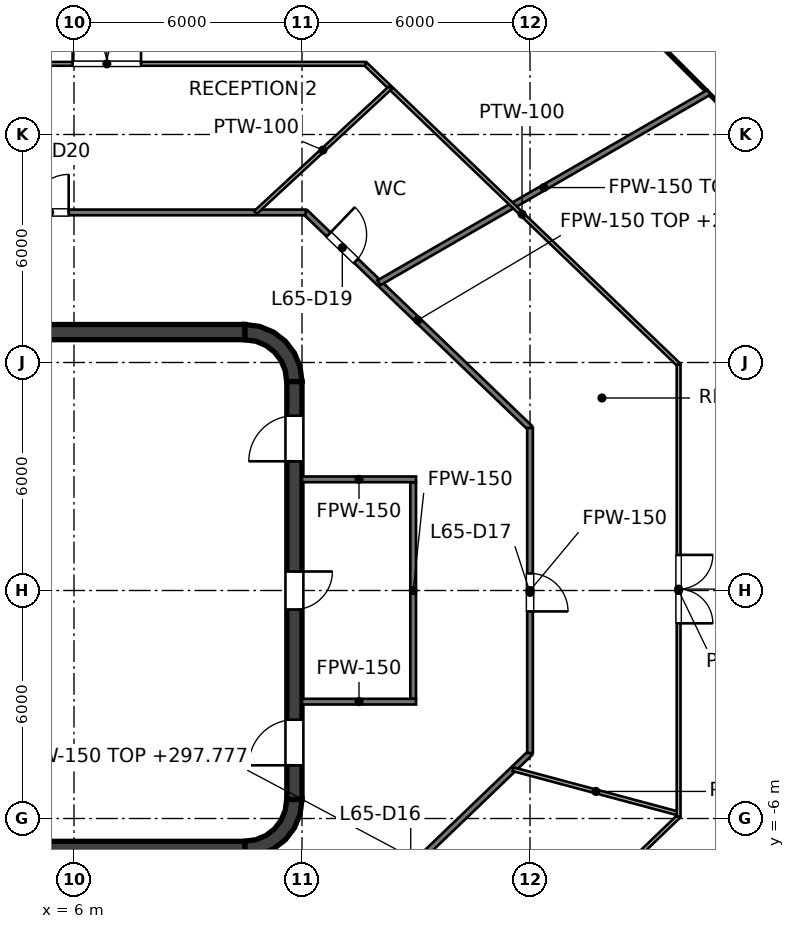
"""IFC4 building model, lengths in metres.
Left out: names, types, materials, properties, quantities, classifications, styles, units other than length and angle.
Written with IfcOpenShell. Run it as: python <this file> out.ifc"""

import sys

from ifc_helpers import new_model, si_unit, direction, frame, frame_2d, origin, place, context, subcontext, project, spatial, polyline, rectangle, outline, extrude, element, fill, save


model = new_model("IFC4")
c1 = context("Model", 3, precision=1e-05, world=origin(), true_north=direction((0.0, 1.0)))
c2 = subcontext(c1, "Body", "Model", "MODEL_VIEW")
j1 = project(units=[si_unit("LENGTHUNIT", "METRE"), si_unit("PLANEANGLEUNIT", "RADIAN")], contexts=[c1])
p1 = place(None, origin())
s1 = spatial("IfcSite", under=j1, at=p1, CompositionType="ELEMENT")
p2 = place(p1, origin())
s2 = spatial("IfcBuilding", under=s1, at=p2, CompositionType="ELEMENT")
p3 = place(p2, frame((0.0, 0.0, 295.0)))
s3 = spatial("IfcBuildingStorey", under=s2, at=p3, CompositionType="ELEMENT", Elevation=295.0)
for number, where, z_axis, x_axis in (
    (1, (-10.5, 6.8, 0.0), (0.0, 0.0, 1.0), (1.0, 0.0, 0.0)),
    (2, (-10.5, -6.8, 0.0), (0.0, 0.0, 1.0), (1.0, 0.0, 0.0)),
):
    element("IfcWall", number, at=place(p3, frame(where, z_axis=z_axis, x_axis=x_axis)), inside=s3, PredefinedType="SHEAR", context=c2, shape_type="SweptSolid", body=[
        extrude(rectangle(XDim=21.0, YDim=0.4, at=frame_2d((10.5, 0.0))), origin(), (0.0, 0.0, 1.0), 4.0),
    ])
p4 = place(p3, frame((11.8, -5.5, 0.0), z_axis=(0.0, 0.0, 1.0), x_axis=(0.0, 1.0, 0.0)))
e3 = element("IfcWall", 3, at=p4, inside=s3, PredefinedType="SHEAR", context=c2, shape_type="SweptSolid", body=[
    extrude(rectangle(XDim=11.0, YDim=0.4, at=frame_2d((5.5, 0.0))), origin(), (0.0, 0.0, 1.0), 4.0),
])
p5 = place(p4, frame((5.0, 0.0, 0.0)))
e4 = element("IfcOpeningElement", 4, at=p5, cuts=e3, PredefinedType="OPENING", context=c2, shape_type="SweptSolid", body=[
    extrude(rectangle(XDim=1.0, YDim=2.1, at=frame_2d((0.5, 1.05))), frame((0.0, 0.2, 0.0), z_axis=(0.0, -1.0, 0.0), x_axis=(1.0, 0.0, 0.0)), (0.0, 0.0, 1.0), 0.4),
])
p6 = place(p4, frame((0.9, 0.0, 0.0)))
e5 = element("IfcOpeningElement", 5, at=p6, cuts=e3, PredefinedType="OPENING", context=c2, shape_type="SweptSolid", body=[
    extrude(rectangle(XDim=1.2, YDim=2.1, at=frame_2d((0.6, 1.05))), frame((0.0, 0.2, 0.0), z_axis=(0.0, -1.0, 0.0), x_axis=(1.0, 0.0, 0.0)), (0.0, 0.0, 1.0), 0.4),
])
p7 = place(p4, frame((8.9, 0.0, 0.0)))
e6 = element("IfcOpeningElement", 6, at=p7, cuts=e3, PredefinedType="OPENING", context=c2, shape_type="SweptSolid", body=[
    extrude(rectangle(XDim=1.2, YDim=2.1, at=frame_2d((0.6, 1.05))), frame((0.0, 0.2, 0.0), z_axis=(0.0, -1.0, 0.0), x_axis=(1.0, 0.0, 0.0)), (0.0, 0.0, 1.0), 0.4),
])
p8 = place(p3, origin())
e7 = element("IfcWall", 7, at=p8, inside=s3, PredefinedType="SHEAR", context=c2, shape_type="SweptSolid", body=[
    extrude(outline(polyline([(10.5, 7.0), (10.5, 6.596), (10.784, 6.559), (11.048, 6.45), (11.275, 6.275), (11.45, 6.048), (11.559, 5.784), (11.596, 5.5), (12.0, 5.5), (11.949, 5.888), (11.799, 6.25), (11.561, 6.561), (11.25, 6.799), (10.888, 6.949), (10.5, 7.0)])), origin(), (0.0, 0.0, 1.0), 4.0),
])
e8 = element("IfcWall", 8, at=p8, inside=s3, PredefinedType="SHEAR", context=c2, shape_type="SweptSolid", body=[
    extrude(outline(polyline([(12.0, -5.5), (11.596, -5.5), (11.559, -5.784), (11.45, -6.048), (11.275, -6.275), (11.048, -6.45), (10.784, -6.559), (10.5, -6.596), (10.5, -7.0), (10.888, -6.949), (11.25, -6.799), (11.561, -6.561), (11.799, -6.25), (11.949, -5.888), (12.0, -5.5)])), origin(), (0.0, 0.0, 1.0), 4.0),
])
p9 = place(p3, frame((9.0, 4.1, 0.0), z_axis=(0.0, 0.0, 1.0), x_axis=(0.0, 1.0, 0.0)))
e9 = element("IfcWall", 9, at=p9, inside=s3, PredefinedType="SOLIDWALL", context=c2, shape_type="SweptSolid", body=[
    extrude(rectangle(XDim=2.5, YDim=0.25, at=frame_2d((1.25, 0.0))), origin(), (0.0, 0.0, 1.0), 3.7),
])
p10 = place(p9, frame((0.65, 0.0, 0.0)))
e10 = element("IfcOpeningElement", 10, at=p10, cuts=e9, PredefinedType="OPENING", context=c2, shape_type="SweptSolid", body=[
    extrude(rectangle(XDim=1.2, YDim=2.1, at=frame_2d((0.6, 1.05))), frame((0.0, 0.125, 0.0), z_axis=(0.0, -1.0, 0.0), x_axis=(1.0, 0.0, 0.0)), (0.0, 0.0, 1.0), 0.25),
])
p11 = place(p3, frame((9.0, -6.6, 0.0), z_axis=(0.0, 0.0, 1.0), x_axis=(0.0, 1.0, 0.0)))
e11 = element("IfcWall", 11, at=p11, inside=s3, PredefinedType="SOLIDWALL", context=c2, shape_type="SweptSolid", body=[
    extrude(rectangle(XDim=2.5, YDim=0.25, at=frame_2d((1.25, 0.0))), origin(), (0.0, 0.0, 1.0), 3.7),
])
p12 = place(p11, frame((0.65, 0.0, 0.0)))
e12 = element("IfcOpeningElement", 12, at=p12, cuts=e11, PredefinedType="OPENING", context=c2, shape_type="SweptSolid", body=[
    extrude(rectangle(XDim=1.2, YDim=2.1, at=frame_2d((0.6, 1.05))), frame((0.0, 0.125, 0.0), z_axis=(0.0, -1.0, 0.0), x_axis=(1.0, 0.0, 0.0)), (0.0, 0.0, 1.0), 0.25),
])
p13 = place(p3, frame((0.775, 1.525, 0.0), z_axis=(0.0, 0.0, 1.0), x_axis=(1.0, 0.0, 0.0)))
e13 = element("IfcWall", 13, at=p13, inside=s3, PredefinedType="SOLIDWALL", context=c2, shape_type="SweptSolid", body=[
    extrude(rectangle(XDim=8.35, YDim=0.25, at=frame_2d((4.175, 0.0))), origin(), (0.0, 0.0, 1.0), 3.7),
])
p14 = place(p13, frame((0.925, 0.0, 0.0)))
e14 = element("IfcOpeningElement", 14, at=p14, cuts=e13, PredefinedType="OPENING", context=c2, shape_type="SweptSolid", body=[
    extrude(rectangle(XDim=1.1, YDim=2.1, at=frame_2d((0.55, 1.05))), frame((0.0, 0.125, 0.0), z_axis=(0.0, -1.0, 0.0), x_axis=(1.0, 0.0, 0.0)), (0.0, 0.0, 1.0), 0.25),
])
p15 = place(p13, frame((3.625, 0.0, 0.0)))
e15 = element("IfcOpeningElement", 15, at=p15, cuts=e13, PredefinedType="OPENING", context=c2, shape_type="SweptSolid", body=[
    extrude(rectangle(XDim=1.1, YDim=2.1, at=frame_2d((0.55, 1.05))), frame((0.0, 0.125, 0.0), z_axis=(0.0, -1.0, 0.0), x_axis=(1.0, 0.0, 0.0)), (0.0, 0.0, 1.0), 0.25),
])
p16 = place(p13, frame((6.325, 0.0, 0.0)))
e16 = element("IfcOpeningElement", 16, at=p16, cuts=e13, PredefinedType="OPENING", context=c2, shape_type="SweptSolid", body=[
    extrude(rectangle(XDim=1.1, YDim=2.1, at=frame_2d((0.55, 1.05))), frame((0.0, 0.125, 0.0), z_axis=(0.0, -1.0, 0.0), x_axis=(1.0, 0.0, 0.0)), (0.0, 0.0, 1.0), 0.25),
])
p17 = place(p3, frame((0.775, 3.975, 0.0), z_axis=(0.0, 0.0, 1.0), x_axis=(1.0, 0.0, 0.0)))
e17 = element("IfcWall", 17, at=p17, inside=s3, PredefinedType="SOLIDWALL", context=c2, shape_type="SweptSolid", body=[
    extrude(rectangle(XDim=8.35, YDim=0.25, at=frame_2d((4.175, 0.0))), origin(), (0.0, 0.0, 1.0), 3.7),
])
for number, where, z_axis, x_axis in (
    (18, (9.0, 1.65, 0.0), (0.0, 0.0, 1.0), (0.0, 1.0, 0.0)),
    (19, (6.3, 1.65, 0.0), (0.0, 0.0, 1.0), (0.0, 1.0, 0.0)),
):
    element("IfcWall", number, at=place(p3, frame(where, z_axis=z_axis, x_axis=x_axis)), inside=s3, PredefinedType="SOLIDWALL", context=c2, shape_type="SweptSolid", body=[
        extrude(rectangle(XDim=2.2, YDim=0.25, at=frame_2d((1.1, 0.0))), origin(), (0.0, 0.0, 1.0), 3.7),
    ])
p18 = place(p3, frame((-9.125, -1.525, 0.0), z_axis=(0.0, 0.0, 1.0), x_axis=(1.0, 0.0, 0.0)))
e20 = element("IfcWall", 20, at=p18, inside=s3, PredefinedType="SOLIDWALL", context=c2, shape_type="SweptSolid", body=[
    extrude(rectangle(XDim=18.25, YDim=0.25, at=frame_2d((9.125, 0.0))), origin(), (0.0, 0.0, 1.0), 3.7),
])
p19 = place(p18, frame((7.15, 0.0, 0.0)))
e21 = element("IfcOpeningElement", 21, at=p19, cuts=e20, PredefinedType="OPENING", context=c2, shape_type="SweptSolid", body=[
    extrude(rectangle(XDim=1.2, YDim=2.1, at=frame_2d((0.6, 1.05))), frame((0.0, 0.125, 0.0), z_axis=(0.0, -1.0, 0.0), x_axis=(1.0, 0.0, 0.0)), (0.0, 0.0, 1.0), 0.25),
])
p20 = place(p18, frame((10.2, 0.0, 0.0)))
e22 = element("IfcOpeningElement", 22, at=p20, cuts=e20, PredefinedType="OPENING", context=c2, shape_type="SweptSolid", body=[
    extrude(rectangle(XDim=1.2, YDim=2.1, at=frame_2d((0.6, 1.05))), frame((0.0, 0.125, 0.0), z_axis=(0.0, -1.0, 0.0), x_axis=(1.0, 0.0, 0.0)), (0.0, 0.0, 1.0), 0.25),
])
p21 = place(p18, frame((16.075, 0.0, 0.0)))
e23 = element("IfcOpeningElement", 23, at=p21, cuts=e20, PredefinedType="OPENING", context=c2, shape_type="SweptSolid", body=[
    extrude(rectangle(XDim=1.0, YDim=2.1, at=frame_2d((0.5, 1.05))), frame((0.0, 0.125, 0.0), z_axis=(0.0, -1.0, 0.0), x_axis=(1.0, 0.0, 0.0)), (0.0, 0.0, 1.0), 0.25),
])
p22 = place(p3, frame((3.275, -3.975, 0.0), z_axis=(0.0, 0.0, 1.0), x_axis=(1.0, 0.0, 0.0)))
e24 = element("IfcWall", 24, at=p22, inside=s3, PredefinedType="SOLIDWALL", context=c2, shape_type="SweptSolid", body=[
    extrude(rectangle(XDim=5.85, YDim=0.25, at=frame_2d((2.925, 0.0))), origin(), (0.0, 0.0, 1.0), 3.7),
])
for number, where, z_axis, x_axis in (
    (25, (5.9, -3.85, 0.0), (0.0, 0.0, 1.0), (0.0, 1.0, 0.0)),
    (26, (9.0, -3.85, 0.0), (0.0, 0.0, 1.0), (0.0, 1.0, 0.0)),
):
    element("IfcWall", number, at=place(p3, frame(where, z_axis=z_axis, x_axis=x_axis)), inside=s3, PredefinedType="SOLIDWALL", context=c2, shape_type="SweptSolid", body=[
        extrude(rectangle(XDim=2.2, YDim=0.25, at=frame_2d((1.1, 0.0))), origin(), (0.0, 0.0, 1.0), 3.7),
    ])
p23 = place(p3, frame((14.925, -2.85, 0.0), z_axis=(0.0, 0.0, 1.0), x_axis=(0.0, 1.0, 0.0)))
e27 = element("IfcWall", 27, at=p23, inside=s3, PredefinedType="PARTITIONING", context=c2, shape_type="SweptSolid", body=[
    extrude(rectangle(XDim=5.7, YDim=0.15, at=frame_2d((2.85, 0.0))), origin(), (0.0, 0.0, 1.0), 2.768),
])
for number, where, z_axis, x_axis in (
    (28, (12.0, 2.925, 0.0), (0.0, 0.0, 1.0), (1.0, 0.0, 0.0)),
    (29, (12.0, -2.925, 0.0), (0.0, 0.0, 1.0), (1.0, 0.0, 0.0)),
):
    element("IfcWall", number, at=place(p3, frame(where, z_axis=z_axis, x_axis=x_axis)), inside=s3, PredefinedType="PARTITIONING", context=c2, shape_type="SweptSolid", body=[
        extrude(rectangle(XDim=3.0, YDim=0.15, at=frame_2d((1.5, 0.0))), origin(), (0.0, 0.0, 1.0), 2.768),
    ])
p24 = place(p3, frame((12.095, 9.949, 0.0), z_axis=(0.0, 0.0, 1.0), x_axis=(0.721290181137, -0.692633001376, 0.0)))
e30 = element("IfcWall", 30, at=p24, inside=s3, PredefinedType="PARTITIONING", context=c2, shape_type="SweptSolid", body=[
    extrude(rectangle(XDim=8.187, YDim=0.15, at=frame_2d((4.094, 0.0))), origin(), (0.0, 0.0, 1.0), 2.777),
])
p25 = place(p24, frame((0.839, 0.0, 0.0)))
e31 = element("IfcOpeningElement", 31, at=p25, cuts=e30, PredefinedType="OPENING", context=c2, shape_type="SweptSolid", body=[
    extrude(rectangle(XDim=1.0, YDim=2.1, at=frame_2d((0.5, 1.05))), frame((0.0, 0.075, 0.0), z_axis=(0.0, -1.0, 0.0), x_axis=(1.0, 0.0, 0.0)), (0.0, 0.0, 1.0), 0.15),
])
p26 = place(p3, frame((-12.095, 9.949, 0.0), z_axis=(0.0, 0.0, 1.0), x_axis=(1.0, 0.0, 0.0)))
e32 = element("IfcWall", 32, at=p26, inside=s3, PredefinedType="PARTITIONING", context=c2, shape_type="SweptSolid", body=[
    extrude(rectangle(XDim=24.19, YDim=0.15, at=frame_2d((12.095, 0.0))), origin(), (0.0, 0.0, 1.0), 2.768),
])
p27 = place(p26, frame((16.955, 0.0, 0.0)))
e33 = element("IfcOpeningElement", 33, at=p27, cuts=e32, PredefinedType="OPENING", context=c2, shape_type="SweptSolid", body=[
    extrude(rectangle(XDim=1.0, YDim=2.1, at=frame_2d((0.5, 1.05))), frame((0.0, 0.075, 0.0), z_axis=(0.0, -1.0, 0.0), x_axis=(1.0, 0.0, 0.0)), (0.0, 0.0, 1.0), 0.15),
])
p28 = place(p26, frame((10.233, 0.0, 0.0)))
e34 = element("IfcOpeningElement", 34, at=p28, cuts=e32, PredefinedType="OPENING", context=c2, shape_type="SweptSolid", body=[
    extrude(rectangle(XDim=1.0, YDim=2.1, at=frame_2d((0.5, 1.05))), frame((0.0, 0.075, 0.0), z_axis=(0.0, -1.0, 0.0), x_axis=(1.0, 0.0, 0.0)), (0.0, 0.0, 1.0), 0.15),
])
p29 = place(p26, frame((5.288, 0.0, 0.0)))
e35 = element("IfcOpeningElement", 35, at=p29, cuts=e32, PredefinedType="OPENING", context=c2, shape_type="SweptSolid", body=[
    extrude(rectangle(XDim=1.0, YDim=2.1, at=frame_2d((0.5, 1.05))), frame((0.0, 0.075, 0.0), z_axis=(0.0, -1.0, 0.0), x_axis=(1.0, 0.0, 0.0)), (0.0, 0.0, 1.0), 0.15),
])
p30 = place(p3, frame((14.024, 8.097, 0.0), z_axis=(0.0, 0.0, 1.0), x_axis=(0.866012014455, 0.500023190282, 0.0)))
e36 = element("IfcWall", 36, at=p30, inside=s3, PredefinedType="PARTITIONING", context=c2, shape_type="SweptSolid", body=[
    extrude(rectangle(XDim=10.025, YDim=0.15, at=frame_2d((5.013, 0.0))), origin(), (0.0, 0.0, 1.0), 3.274),
])
p31 = place(p3, frame((12.095, -9.949, 0.0), z_axis=(0.0, 0.0, 1.0), x_axis=(0.721348586031, 0.692572174889, 0.0)))
e37 = element("IfcWall", 37, at=p31, inside=s3, PredefinedType="PARTITIONING", context=c2, shape_type="SweptSolid", body=[
    extrude(rectangle(XDim=8.187, YDim=0.15, at=frame_2d((4.094, 0.0))), origin(), (0.0, 0.0, 1.0), 2.777),
])
p32 = place(p31, frame((3.334, 0.0, 0.0)))
e38 = element("IfcOpeningElement", 38, at=p32, cuts=e37, PredefinedType="OPENING", context=c2, shape_type="SweptSolid", body=[
    extrude(rectangle(XDim=1.0, YDim=2.1, at=frame_2d((0.5, 1.05))), frame((0.0, 0.075, 0.0), z_axis=(0.0, -1.0, 0.0), x_axis=(1.0, 0.0, 0.0)), (0.0, 0.0, 1.0), 0.15),
])
p33 = place(p3, frame((18.0, -4.278, 0.0), z_axis=(0.0, 0.0, 1.0), x_axis=(0.0, 1.0, 0.0)))
e39 = element("IfcWall", 39, at=p33, inside=s3, PredefinedType="PARTITIONING", context=c2, shape_type="SweptSolid", body=[
    extrude(rectangle(XDim=8.556, YDim=0.15, at=frame_2d((4.278, 0.0))), origin(), (0.0, 0.0, 1.0), 2.768),
])
p34 = place(p33, frame((3.728, 0.0, 0.0)))
e40 = element("IfcOpeningElement", 40, at=p34, cuts=e39, PredefinedType="OPENING", context=c2, shape_type="SweptSolid", body=[
    extrude(rectangle(XDim=1.0, YDim=2.1, at=frame_2d((0.5, 1.05))), frame((0.0, 0.075, 0.0), z_axis=(0.0, -1.0, 0.0), x_axis=(1.0, 0.0, 0.0)), (0.0, 0.0, 1.0), 0.15),
])
p35 = place(p3, frame((13.668, 13.859, 0.0), z_axis=(0.0, 0.0, 1.0), x_axis=(0.721286980933, -0.692636333971, 0.0)))
e41 = element("IfcWall", 41, at=p35, inside=s3, PredefinedType="PARTITIONING", context=c2, shape_type="SweptSolid", body=[
    extrude(rectangle(XDim=11.427, YDim=0.1, at=frame_2d((5.713, 0.0))), origin(), (0.0, 0.0, 1.0), 2.777),
])
p36 = place(p3, frame((17.556, -4.704, 0.0), z_axis=(0.0, 0.0, 1.0), x_axis=(0.965906947234, -0.258889492418, 0.0)))
e42 = element("IfcWall", 42, at=p36, inside=s3, PredefinedType="PARTITIONING", context=c2, shape_type="SweptSolid", body=[
    extrude(rectangle(XDim=4.508, YDim=0.1, at=frame_2d((2.254, 0.0))), origin(), (0.0, 0.0, 1.0), 3.7),
])
p37 = place(p3, frame((-13.668, 13.859, 0.0), z_axis=(0.0, 0.0, 1.0), x_axis=(1.0, 0.0, 0.0)))
e43 = element("IfcWall", 43, at=p37, inside=s3, PredefinedType="PARTITIONING", context=c2, shape_type="SweptSolid", body=[
    extrude(rectangle(XDim=27.336, YDim=0.1, at=frame_2d((13.668, 0.0))), origin(), (0.0, 0.0, 1.0), 2.768),
])
p38 = place(p37, frame((19.633, 0.0, 0.0)))
e44 = element("IfcOpeningElement", 44, at=p38, cuts=e43, PredefinedType="OPENING", context=c2, shape_type="SweptSolid", body=[
    extrude(rectangle(XDim=1.8, YDim=2.1, at=frame_2d((0.9, 1.05))), frame((0.0, 0.05, 0.0), z_axis=(0.0, -1.0, 0.0), x_axis=(1.0, 0.0, 0.0)), (0.0, 0.0, 1.0), 0.1),
])
p39 = place(p3, frame((10.777, 9.949, 0.0), z_axis=(0.0, 0.0, 1.0), x_axis=(0.733892218001, 0.679265936403, 0.0)))
e45 = element("IfcWall", 45, at=p39, inside=s3, PredefinedType="PARTITIONING", context=c2, shape_type="SweptSolid", body=[
    extrude(rectangle(XDim=4.831, YDim=0.1, at=frame_2d((2.416, 0.0))), origin(), (0.0, 0.0, 1.0), 2.777),
])
p40 = place(p3, frame((13.765, -13.765, 0.0), z_axis=(0.0, 0.0, 1.0), x_axis=(0.721423180805, 0.692494472323, 0.0)))
e46 = element("IfcWall", 46, at=p40, inside=s3, PredefinedType="PARTITIONING", context=c2, shape_type="SweptSolid", body=[
    extrude(rectangle(XDim=11.292, YDim=0.1, at=frame_2d((5.646, 0.0))), origin(), (0.0, 0.0, 1.0), 2.777),
])
p41 = place(p3, frame((21.91, -5.944, 0.0), z_axis=(0.0, 0.0, 1.0), x_axis=(0.0, 1.0, 0.0)))
e47 = element("IfcWall", 47, at=p41, inside=s3, PredefinedType="PARTITIONING", context=c2, shape_type="SweptSolid", body=[
    extrude(rectangle(XDim=11.888, YDim=0.1, at=frame_2d((5.944, 0.0))), origin(), (0.0, 0.0, 1.0), 2.768),
])
p42 = place(p41, frame((5.081, 0.0, 0.0)))
e48 = element("IfcOpeningElement", 48, at=p42, cuts=e47, PredefinedType="OPENING", context=c2, shape_type="SweptSolid", body=[
    extrude(rectangle(XDim=1.8, YDim=2.1, at=frame_2d((0.9, 1.05))), frame((0.0, 0.05, 0.0), z_axis=(0.0, -1.0, 0.0), x_axis=(1.0, 0.0, 0.0)), (0.0, 0.0, 1.0), 0.1),
])
p43 = place(p15, origin())
e49 = element("IfcDoor", 49, at=p43, inside=s3, OperationType="DOUBLE_DOOR_SLIDING", PredefinedType="DOOR", context=c2, shape_type="SweptSolid", body=[
    extrude(rectangle(XDim=1.1, YDim=2.1, at=frame_2d((0.55, 1.05))), frame((0.0, 0.025, 0.0), z_axis=(0.0, -1.0, 0.0), x_axis=(1.0, 0.0, 0.0)), (0.0, 0.0, 1.0), 0.05),
])
fill(e15, e49)
p44 = place(p16, origin())
e50 = element("IfcDoor", 50, at=p44, inside=s3, OperationType="DOUBLE_DOOR_SLIDING", PredefinedType="DOOR", context=c2, shape_type="SweptSolid", body=[
    extrude(rectangle(XDim=1.1, YDim=2.1, at=frame_2d((0.55, 1.05))), frame((0.0, 0.025, 0.0), z_axis=(0.0, -1.0, 0.0), x_axis=(1.0, 0.0, 0.0)), (0.0, 0.0, 1.0), 0.05),
])
fill(e16, e50)
p45 = place(p10, origin())
e51 = element("IfcDoor", 51, at=p45, inside=s3, OperationType="SINGLE_SWING_LEFT", PredefinedType="DOOR", context=c2, shape_type="SweptSolid", body=[
    extrude(rectangle(XDim=1.2, YDim=2.1, at=frame_2d((0.6, 1.05))), frame((0.0, 0.025, 0.0), z_axis=(0.0, -1.0, 0.0), x_axis=(1.0, 0.0, 0.0)), (0.0, 0.0, 1.0), 0.05),
])
fill(e10, e51)
p46 = place(p12, origin())
e52 = element("IfcDoor", 52, at=p46, inside=s3, OperationType="SINGLE_SWING_LEFT", PredefinedType="DOOR", context=c2, shape_type="SweptSolid", body=[
    extrude(rectangle(XDim=1.2, YDim=2.1, at=frame_2d((0.6, 1.05))), frame((0.0, 0.025, 0.0), z_axis=(0.0, -1.0, 0.0), x_axis=(1.0, 0.0, 0.0)), (0.0, 0.0, 1.0), 0.05),
])
fill(e12, e52)
p47 = place(p21, origin())
e53 = element("IfcDoor", 53, at=p47, inside=s3, OperationType="SINGLE_SWING_RIGHT", PredefinedType="DOOR", context=c2, shape_type="SweptSolid", body=[
    extrude(rectangle(XDim=1.0, YDim=2.1, at=frame_2d((0.5, 1.05))), frame((0.0, 0.025, 0.0), z_axis=(0.0, -1.0, 0.0), x_axis=(1.0, 0.0, 0.0)), (0.0, 0.0, 1.0), 0.05),
])
fill(e23, e53)
p48 = place(p5, origin())
e54 = element("IfcDoor", 54, at=p48, inside=s3, OperationType="SINGLE_SWING_RIGHT", PredefinedType="DOOR", context=c2, shape_type="SweptSolid", body=[
    extrude(rectangle(XDim=1.0, YDim=2.1, at=frame_2d((0.5, 1.05))), frame((0.0, 0.025, 0.0), z_axis=(0.0, -1.0, 0.0), x_axis=(1.0, 0.0, 0.0)), (0.0, 0.0, 1.0), 0.05),
])
fill(e4, e54)
p49 = place(p6, origin())
e55 = element("IfcDoor", 55, at=p49, inside=s3, OperationType="SINGLE_SWING_LEFT", PredefinedType="DOOR", context=c2, shape_type="SweptSolid", body=[
    extrude(rectangle(XDim=1.2, YDim=2.1, at=frame_2d((0.6, 1.05))), frame((0.0, 0.025, 0.0), z_axis=(0.0, -1.0, 0.0), x_axis=(1.0, 0.0, 0.0)), (0.0, 0.0, 1.0), 0.05),
])
fill(e5, e55)
p50 = place(p7, origin())
e56 = element("IfcDoor", 56, at=p50, inside=s3, OperationType="SINGLE_SWING_LEFT", PredefinedType="DOOR", context=c2, shape_type="SweptSolid", body=[
    extrude(rectangle(XDim=1.2, YDim=2.1, at=frame_2d((0.6, 1.05))), frame((0.0, 0.025, 0.0), z_axis=(0.0, -1.0, 0.0), x_axis=(1.0, 0.0, 0.0)), (0.0, 0.0, 1.0), 0.05),
])
fill(e6, e56)
p51 = place(p34, origin())
e57 = element("IfcDoor", 57, at=p51, inside=s3, OperationType="SINGLE_SWING_LEFT", PredefinedType="DOOR", context=c2, shape_type="SweptSolid", body=[
    extrude(rectangle(XDim=1.0, YDim=2.1, at=frame_2d((0.5, 1.05))), frame((0.0, 0.025, 0.0), z_axis=(0.0, -1.0, 0.0), x_axis=(1.0, 0.0, 0.0)), (0.0, 0.0, 1.0), 0.05),
])
fill(e40, e57)
p52 = place(p42, origin())
e58 = element("IfcDoor", 58, at=p52, inside=s3, OperationType="DOUBLE_DOOR_SINGLE_SWING", PredefinedType="DOOR", context=c2, shape_type="SweptSolid", body=[
    extrude(rectangle(XDim=1.8, YDim=2.1, at=frame_2d((0.9, 1.05))), frame((0.0, 0.025, 0.0), z_axis=(0.0, -1.0, 0.0), x_axis=(1.0, 0.0, 0.0)), (0.0, 0.0, 1.0), 0.05),
])
fill(e48, e58)
p53 = place(p25, origin())
e59 = element("IfcDoor", 59, at=p53, inside=s3, OperationType="SINGLE_SWING_LEFT", PredefinedType="DOOR", context=c2, shape_type="SweptSolid", body=[
    extrude(rectangle(XDim=1.0, YDim=2.1, at=frame_2d((0.5, 1.05))), frame((0.0, 0.025, 0.0), z_axis=(0.0, -1.0, 0.0), x_axis=(1.0, 0.0, 0.0)), (0.0, 0.0, 1.0), 0.05),
])
fill(e31, e59)
p54 = place(p27, origin())
e60 = element("IfcDoor", 60, at=p54, inside=s3, OperationType="SINGLE_SWING_RIGHT", PredefinedType="DOOR", context=c2, shape_type="SweptSolid", body=[
    extrude(rectangle(XDim=1.0, YDim=2.1, at=frame_2d((0.5, 1.05))), frame((0.0, 0.025, 0.0), z_axis=(0.0, -1.0, 0.0), x_axis=(1.0, 0.0, 0.0)), (0.0, 0.0, 1.0), 0.05),
])
fill(e33, e60)
p55 = place(p38, origin())
e61 = element("IfcDoor", 61, at=p55, inside=s3, OperationType="DOUBLE_DOOR_SINGLE_SWING", PredefinedType="DOOR", context=c2, shape_type="SweptSolid", body=[
    extrude(rectangle(XDim=1.8, YDim=2.1, at=frame_2d((0.9, 1.05))), frame((0.0, 0.025, 0.0), z_axis=(0.0, -1.0, 0.0), x_axis=(1.0, 0.0, 0.0)), (0.0, 0.0, 1.0), 0.05),
])
fill(e44, e61)
save(model, sys.argv[1])
